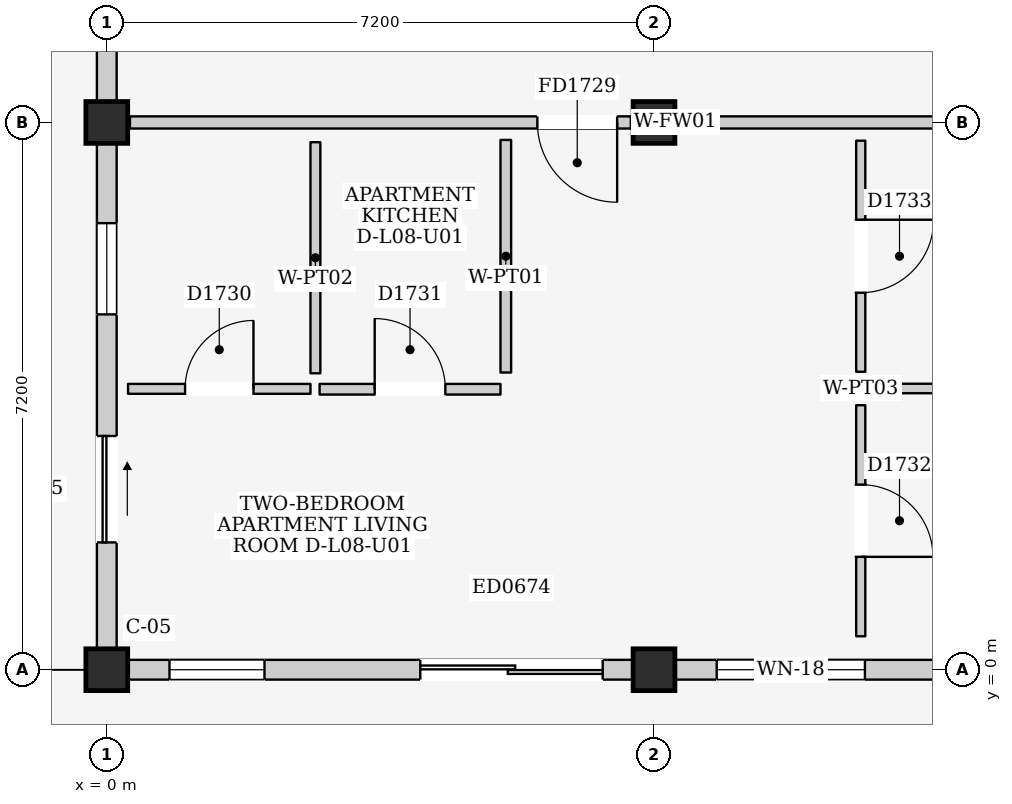
"""IFC4 building model, lengths in metres.
Left out: names, types, materials, properties, quantities, classifications, styles, units other than length and angle.
Written with IfcOpenShell. Run it as: python <this file> out.ifc"""

import sys

from ifc_helpers import new_model, si_unit, direction, frame, frame_2d, origin, origin_2d, place, context, subcontext, project, spatial, rectangle, extrude, element, fill, save


model = new_model("IFC4")
c1 = context("Model", 3, precision=1e-05, world=origin(), true_north=direction((0.0, 1.0)))
c2 = subcontext(c1, "Body", "Model", "MODEL_VIEW")
j1 = project(units=[si_unit("LENGTHUNIT", "METRE"), si_unit("PLANEANGLEUNIT", "RADIAN")], contexts=[c1])
p1 = place(None, origin())
s1 = spatial("IfcSite", under=j1, at=p1, CompositionType="ELEMENT")
p2 = place(p1, origin())
s2 = spatial("IfcBuilding", under=s1, at=p2, CompositionType="ELEMENT")
p3 = place(p2, frame((0.0, 0.0, 28.3)))
s3 = spatial("IfcBuildingStorey", under=s2, at=p3, CompositionType="ELEMENT", Elevation=28.3)
for number, where, z_axis, x_axis in (
    (1, (0.0, 0.0, 0.0), (0.0, 0.0, 1.0), (1.0, 0.0, 0.0)),
    (2, (0.0, 7.2, 0.0), (0.0, 0.0, 1.0), (1.0, 0.0, 0.0)),
    (3, (7.2, 0.0, 0.0), (0.0, 0.0, 1.0), (1.0, 0.0, 0.0)),
    (4, (7.2, 7.2, 0.0), (0.0, 0.0, 1.0), (1.0, 0.0, 0.0)),
):
    element("IfcColumn", number, at=place(p3, frame(where, z_axis=z_axis, x_axis=x_axis)), inside=s3, PredefinedType="COLUMN", context=c2, shape_type="SweptSolid", body=[
        extrude(rectangle(XDim=0.55, YDim=0.55, at=origin_2d()), origin(), (0.0, 0.0, 1.0), 3.2),
    ])
p4 = place(p3, frame((0.275, 0.0, 0.0), z_axis=(0.0, 0.0, 1.0), x_axis=(1.0, 0.0, 0.0)))
e5 = element("IfcWall", 5, at=p4, inside=s3, PredefinedType="ELEMENTEDWALL", context=c2, shape_type="SweptSolid", body=[
    extrude(rectangle(XDim=6.65, YDim=0.26, at=frame_2d((3.325, 0.0))), origin(), (0.0, 0.0, 1.0), 2.495),
])
p5 = place(p4, frame((3.85, 0.0, 0.0)))
e6 = element("IfcOpeningElement", 6, at=p5, cuts=e5, PredefinedType="OPENING", context=c2, shape_type="SweptSolid", body=[
    extrude(rectangle(XDim=2.4, YDim=2.12, at=frame_2d((1.2, 1.06))), frame((0.0, 0.145, 0.0), z_axis=(0.0, -1.0, 0.0), x_axis=(1.0, 0.0, 0.0)), (0.0, 0.0, 1.0), 0.29),
])
p6 = place(p4, frame((0.55, 0.0, 0.9)))
e7 = element("IfcOpeningElement", 7, at=p6, cuts=e5, PredefinedType="OPENING", context=c2, shape_type="SweptSolid", body=[
    extrude(rectangle(XDim=1.25, YDim=1.3, at=frame_2d((0.625, 0.65))), frame((0.0, 0.145, 0.0), z_axis=(0.0, -1.0, 0.0), x_axis=(1.0, 0.0, 0.0)), (0.0, 0.0, 1.0), 0.29),
])
p7 = place(p3, frame((0.0, 0.275, 0.0), z_axis=(0.0, 0.0, 1.0), x_axis=(0.0, 1.0, 0.0)))
e8 = element("IfcWall", 8, at=p7, inside=s3, PredefinedType="ELEMENTEDWALL", context=c2, shape_type="SweptSolid", body=[
    extrude(rectangle(XDim=6.65, YDim=0.26, at=frame_2d((3.325, 0.0))), origin(), (0.0, 0.0, 1.0), 2.495),
])
p8 = place(p7, frame((1.4, 0.0, 0.0)))
e9 = element("IfcOpeningElement", 9, at=p8, cuts=e8, PredefinedType="OPENING", context=c2, shape_type="SweptSolid", body=[
    extrude(rectangle(XDim=1.4, YDim=2.1, at=frame_2d((0.7, 1.05))), frame((0.0, 0.145, 0.0), z_axis=(0.0, -1.0, 0.0), x_axis=(1.0, 0.0, 0.0)), (0.0, 0.0, 1.0), 0.29),
])
p9 = place(p7, frame((4.4, 0.0, 0.95)))
e10 = element("IfcOpeningElement", 10, at=p9, cuts=e8, PredefinedType="OPENING", context=c2, shape_type="SweptSolid", body=[
    extrude(rectangle(XDim=1.2, YDim=1.35, at=frame_2d((0.6, 0.675))), frame((0.0, 0.145, 0.0), z_axis=(0.0, -1.0, 0.0), x_axis=(1.0, 0.0, 0.0)), (0.0, 0.0, 1.0), 0.29),
])
p10 = place(p3, frame((0.0, 7.475, 0.0), z_axis=(0.0, 0.0, 1.0), x_axis=(0.0, 1.0, 0.0)))
e11 = element("IfcWall", 11, at=p10, inside=s3, PredefinedType="ELEMENTEDWALL", context=c2, shape_type="SweptSolid", body=[
    extrude(rectangle(XDim=6.65, YDim=0.26, at=frame_2d((3.325, 0.0))), origin(), (0.0, 0.0, 1.0), 2.495),
])
p11 = place(p10, frame((3.65, 0.0, 0.0)))
e12 = element("IfcOpeningElement", 12, at=p11, cuts=e11, PredefinedType="OPENING", context=c2, shape_type="SweptSolid", body=[
    extrude(rectangle(XDim=1.4, YDim=2.1, at=frame_2d((0.7, 1.05))), frame((0.0, 0.145, 0.0), z_axis=(0.0, -1.0, 0.0), x_axis=(1.0, 0.0, 0.0)), (0.0, 0.0, 1.0), 0.29),
])
p12 = place(p3, frame((7.475, 0.0, 0.0), z_axis=(0.0, 0.0, 1.0), x_axis=(1.0, 0.0, 0.0)))
e13 = element("IfcWall", 13, at=p12, inside=s3, PredefinedType="ELEMENTEDWALL", context=c2, shape_type="SweptSolid", body=[
    extrude(rectangle(XDim=6.65, YDim=0.26, at=frame_2d((3.325, 0.0))), origin(), (0.0, 0.0, 1.0), 2.495),
])
p13 = place(p12, frame((3.85, 0.0, 0.0)))
e14 = element("IfcOpeningElement", 14, at=p13, cuts=e13, PredefinedType="OPENING", context=c2, shape_type="SweptSolid", body=[
    extrude(rectangle(XDim=2.0, YDim=2.12, at=frame_2d((1.0, 1.06))), frame((0.0, 0.145, 0.0), z_axis=(0.0, -1.0, 0.0), x_axis=(1.0, 0.0, 0.0)), (0.0, 0.0, 1.0), 0.29),
])
p14 = place(p12, frame((0.55, 0.0, 0.83)))
e15 = element("IfcOpeningElement", 15, at=p14, cuts=e13, PredefinedType="OPENING", context=c2, shape_type="SweptSolid", body=[
    extrude(rectangle(XDim=1.95, YDim=1.55, at=frame_2d((0.975, 0.775))), frame((0.0, 0.145, 0.0), z_axis=(0.0, -1.0, 0.0), x_axis=(1.0, 0.0, 0.0)), (0.0, 0.0, 1.0), 0.29),
])
p15 = place(p3, frame((0.305, 7.2, 0.0), z_axis=(0.0, 0.0, 1.0), x_axis=(1.0, 0.0, 0.0)))
e16 = element("IfcWall", 16, at=p15, inside=s3, PredefinedType="PARTITIONING", context=c2, shape_type="SweptSolid", body=[
    extrude(rectangle(XDim=6.59, YDim=0.16, at=frame_2d((3.295, 0.0))), origin(), (0.0, 0.0, 1.0), 2.345),
])
p16 = place(p15, frame((5.36, 0.0, 0.0)))
e17 = element("IfcOpeningElement", 17, at=p16, cuts=e16, PredefinedType="OPENING", context=c2, shape_type="SweptSolid", body=[
    extrude(rectangle(XDim=1.05, YDim=2.15, at=frame_2d((0.525, 1.075))), frame((0.0, 0.095, 0.0), z_axis=(0.0, -1.0, 0.0), x_axis=(1.0, 0.0, 0.0)), (0.0, 0.0, 1.0), 0.19),
])
p17 = place(p3, frame((7.505, 7.2, 0.0), z_axis=(0.0, 0.0, 1.0), x_axis=(1.0, 0.0, 0.0)))
e18 = element("IfcWall", 18, at=p17, inside=s3, PredefinedType="PARTITIONING", context=c2, shape_type="SweptSolid", body=[
    extrude(rectangle(XDim=6.59, YDim=0.16, at=frame_2d((3.295, 0.0))), origin(), (0.0, 0.0, 1.0), 2.345),
])
p18 = place(p3, frame((0.28, 3.695, 0.0), z_axis=(0.0, 0.0, 1.0), x_axis=(1.0, 0.0, 0.0)))
e19 = element("IfcWall", 19, at=p18, inside=s3, PredefinedType="PARTITIONING", context=c2, shape_type="SweptSolid", body=[
    extrude(rectangle(XDim=2.4, YDim=0.13, at=frame_2d((1.2, 0.0))), origin(), (0.0, 0.0, 1.0), 2.95),
])
p19 = place(p18, frame((0.75, 0.0, 0.0)))
e20 = element("IfcOpeningElement", 20, at=p19, cuts=e19, PredefinedType="OPENING", context=c2, shape_type="SweptSolid", body=[
    extrude(rectangle(XDim=0.9, YDim=2.1, at=frame_2d((0.45, 1.05))), frame((0.0, 0.08, 0.0), z_axis=(0.0, -1.0, 0.0), x_axis=(1.0, 0.0, 0.0)), (0.0, 0.0, 1.0), 0.16),
])
p20 = place(p3, frame((2.745, 3.9, 0.0), z_axis=(0.0, 0.0, 1.0), x_axis=(0.0, 1.0, 0.0)))
e21 = element("IfcWall", 21, at=p20, inside=s3, PredefinedType="PARTITIONING", context=c2, shape_type="SweptSolid", body=[
    extrude(rectangle(XDim=3.04, YDim=0.13, at=frame_2d((1.52, 0.0))), origin(), (0.0, 0.0, 1.0), 2.95),
])
p21 = place(p3, frame((2.8, 3.69, 0.0), z_axis=(0.0, 0.0, 1.0), x_axis=(1.0, 0.0, 0.0)))
e22 = element("IfcWall", 22, at=p21, inside=s3, PredefinedType="PARTITIONING", context=c2, shape_type="SweptSolid", body=[
    extrude(rectangle(XDim=2.38, YDim=0.14, at=frame_2d((1.19, 0.0))), origin(), (0.0, 0.0, 1.0), 2.95),
])
p22 = place(p21, frame((0.725, 0.0, 0.0)))
e23 = element("IfcOpeningElement", 23, at=p22, cuts=e22, PredefinedType="OPENING", context=c2, shape_type="SweptSolid", body=[
    extrude(rectangle(XDim=0.93, YDim=2.14, at=frame_2d((0.465, 1.07))), frame((0.0, 0.085, 0.0), z_axis=(0.0, -1.0, 0.0), x_axis=(1.0, 0.0, 0.0)), (0.0, 0.0, 1.0), 0.17),
])
p23 = place(p3, frame((5.25, 3.91, 0.0), z_axis=(0.0, 0.0, 1.0), x_axis=(0.0, 1.0, 0.0)))
e24 = element("IfcWall", 24, at=p23, inside=s3, PredefinedType="PARTITIONING", context=c2, shape_type="SweptSolid", body=[
    extrude(rectangle(XDim=3.06, YDim=0.14, at=frame_2d((1.53, 0.0))), origin(), (0.0, 0.0, 1.0), 2.95),
])
p24 = place(p3, frame((9.92, 0.44, 0.0), z_axis=(0.0, 0.0, 1.0), x_axis=(0.0, 1.0, 0.0)))
e25 = element("IfcWall", 25, at=p24, inside=s3, PredefinedType="PARTITIONING", context=c2, shape_type="SweptSolid", body=[
    extrude(rectangle(XDim=3.04, YDim=0.12, at=frame_2d((1.52, 0.0))), origin(), (0.0, 0.0, 1.0), 2.95),
])
p25 = place(p24, frame((1.045, 0.0, 0.0)))
e26 = element("IfcOpeningElement", 26, at=p25, cuts=e25, PredefinedType="OPENING", context=c2, shape_type="SweptSolid", body=[
    extrude(rectangle(XDim=0.95, YDim=2.15, at=frame_2d((0.475, 1.075))), frame((0.0, 0.075, 0.0), z_axis=(0.0, -1.0, 0.0), x_axis=(1.0, 0.0, 0.0)), (0.0, 0.0, 1.0), 0.15),
])
p26 = place(p3, frame((10.12, 3.7, 0.0), z_axis=(0.0, 0.0, 1.0), x_axis=(1.0, 0.0, 0.0)))
e27 = element("IfcWall", 27, at=p26, inside=s3, PredefinedType="PARTITIONING", context=c2, shape_type="SweptSolid", body=[
    extrude(rectangle(XDim=4.06, YDim=0.125, at=frame_2d((2.03, 0.0))), origin(), (0.0, 0.0, 1.0), 2.95),
])
p27 = place(p3, frame((9.92, 3.92, 0.0), z_axis=(0.0, 0.0, 1.0), x_axis=(0.0, 1.0, 0.0)))
e28 = element("IfcWall", 28, at=p27, inside=s3, PredefinedType="PARTITIONING", context=c2, shape_type="SweptSolid", body=[
    extrude(rectangle(XDim=3.04, YDim=0.12, at=frame_2d((1.52, 0.0))), origin(), (0.0, 0.0, 1.0), 2.95),
])
p28 = place(p27, frame((1.04, 0.0, 0.0)))
e29 = element("IfcOpeningElement", 29, at=p28, cuts=e28, PredefinedType="OPENING", context=c2, shape_type="SweptSolid", body=[
    extrude(rectangle(XDim=0.96, YDim=2.15, at=frame_2d((0.48, 1.075))), frame((0.0, 0.075, 0.0), z_axis=(0.0, -1.0, 0.0), x_axis=(1.0, 0.0, 0.0)), (0.0, 0.0, 1.0), 0.15),
])
p29 = place(p5, frame((2.4, 0.0, 0.0), z_axis=(0.0, 0.0, 1.0), x_axis=(-1.0, 0.0, 0.0)))
e30 = element("IfcDoor", 30, at=p29, inside=s3, OperationType="DOUBLE_DOOR_SLIDING", PredefinedType="DOOR", context=c2, shape_type="SweptSolid", body=[
    extrude(rectangle(XDim=2.4, YDim=2.12, at=frame_2d((1.2, 1.06))), frame((0.0, 0.025, 0.0), z_axis=(0.0, -1.0, 0.0), x_axis=(1.0, 0.0, 0.0)), (0.0, 0.0, 1.0), 0.05),
])
fill(e6, e30)
p30 = place(p6, origin())
e31 = element("IfcWindow", 31, at=p30, inside=s3, PartitioningType="SINGLE_PANEL", PredefinedType="WINDOW", context=c2, shape_type="SweptSolid", body=[
    extrude(rectangle(XDim=1.25, YDim=1.3, at=frame_2d((0.625, 0.65))), frame((0.0, 0.03, 0.0), z_axis=(0.0, -1.0, 0.0), x_axis=(1.0, 0.0, 0.0)), (0.0, 0.0, 1.0), 0.06),
])
fill(e7, e31)
p31 = place(p8, frame((1.4, 0.0, 0.0), z_axis=(0.0, 0.0, 1.0), x_axis=(-1.0, 0.0, 0.0)))
e32 = element("IfcDoor", 32, at=p31, inside=s3, OperationType="SLIDING_TO_RIGHT", PredefinedType="DOOR", context=c2, shape_type="SweptSolid", body=[
    extrude(rectangle(XDim=1.4, YDim=2.1, at=frame_2d((0.7, 1.05))), frame((0.0, 0.025, 0.0), z_axis=(0.0, -1.0, 0.0), x_axis=(1.0, 0.0, 0.0)), (0.0, 0.0, 1.0), 0.05),
])
fill(e9, e32)
p32 = place(p9, origin())
e33 = element("IfcWindow", 33, at=p32, inside=s3, PartitioningType="SINGLE_PANEL", PredefinedType="WINDOW", context=c2, shape_type="SweptSolid", body=[
    extrude(rectangle(XDim=1.2, YDim=1.35, at=frame_2d((0.6, 0.675))), frame((0.0, 0.03, 0.0), z_axis=(0.0, -1.0, 0.0), x_axis=(1.0, 0.0, 0.0)), (0.0, 0.0, 1.0), 0.06),
])
fill(e10, e33)
p33 = place(p14, origin())
e34 = element("IfcWindow", 34, at=p33, inside=s3, PartitioningType="DOUBLE_PANEL_VERTICAL", PredefinedType="WINDOW", context=c2, shape_type="SweptSolid", body=[
    extrude(rectangle(XDim=1.95, YDim=1.55, at=frame_2d((0.975, 0.775))), frame((0.0, 0.03, 0.0), z_axis=(0.0, -1.0, 0.0), x_axis=(1.0, 0.0, 0.0)), (0.0, 0.0, 1.0), 0.06),
])
fill(e15, e34)
p34 = place(p16, frame((1.05, 0.0, 0.0), z_axis=(0.0, 0.0, 1.0), x_axis=(-1.0, 0.0, 0.0)))
e35 = element("IfcDoor", 35, at=p34, inside=s3, OperationType="SINGLE_SWING_LEFT", PredefinedType="DOOR", context=c2, shape_type="SweptSolid", body=[
    extrude(rectangle(XDim=1.05, YDim=2.15, at=frame_2d((0.525, 1.075))), frame((0.0, 0.025, 0.0), z_axis=(0.0, -1.0, 0.0), x_axis=(1.0, 0.0, 0.0)), (0.0, 0.0, 1.0), 0.05),
])
fill(e17, e35)
p35 = place(p19, origin())
e36 = element("IfcDoor", 36, at=p35, inside=s3, OperationType="SINGLE_SWING_RIGHT", PredefinedType="DOOR", context=c2, shape_type="SweptSolid", body=[
    extrude(rectangle(XDim=0.9, YDim=2.1, at=frame_2d((0.45, 1.05))), frame((0.0, 0.025, 0.0), z_axis=(0.0, -1.0, 0.0), x_axis=(1.0, 0.0, 0.0)), (0.0, 0.0, 1.0), 0.05),
])
fill(e20, e36)
p36 = place(p22, origin())
e37 = element("IfcDoor", 37, at=p36, inside=s3, OperationType="SINGLE_SWING_LEFT", PredefinedType="DOOR", context=c2, shape_type="SweptSolid", body=[
    extrude(rectangle(XDim=0.93, YDim=2.14, at=frame_2d((0.465, 1.07))), frame((0.0, 0.025, 0.0), z_axis=(0.0, -1.0, 0.0), x_axis=(1.0, 0.0, 0.0)), (0.0, 0.0, 1.0), 0.05),
])
fill(e23, e37)
p37 = place(p25, frame((0.95, 0.0, 0.0), z_axis=(0.0, 0.0, 1.0), x_axis=(-1.0, 0.0, 0.0)))
e38 = element("IfcDoor", 38, at=p37, inside=s3, OperationType="SINGLE_SWING_RIGHT", PredefinedType="DOOR", context=c2, shape_type="SweptSolid", body=[
    extrude(rectangle(XDim=0.95, YDim=2.15, at=frame_2d((0.475, 1.075))), frame((0.0, 0.025, 0.0), z_axis=(0.0, -1.0, 0.0), x_axis=(1.0, 0.0, 0.0)), (0.0, 0.0, 1.0), 0.05),
])
fill(e26, e38)
p38 = place(p28, frame((0.96, 0.0, 0.0), z_axis=(0.0, 0.0, 1.0), x_axis=(-1.0, 0.0, 0.0)))
e39 = element("IfcDoor", 39, at=p38, inside=s3, OperationType="SINGLE_SWING_LEFT", PredefinedType="DOOR", context=c2, shape_type="SweptSolid", body=[
    extrude(rectangle(XDim=0.96, YDim=2.15, at=frame_2d((0.48, 1.075))), frame((0.0, 0.025, 0.0), z_axis=(0.0, -1.0, 0.0), x_axis=(1.0, 0.0, 0.0)), (0.0, 0.0, 1.0), 0.05),
])
fill(e29, e39)
save(model, sys.argv[1])
